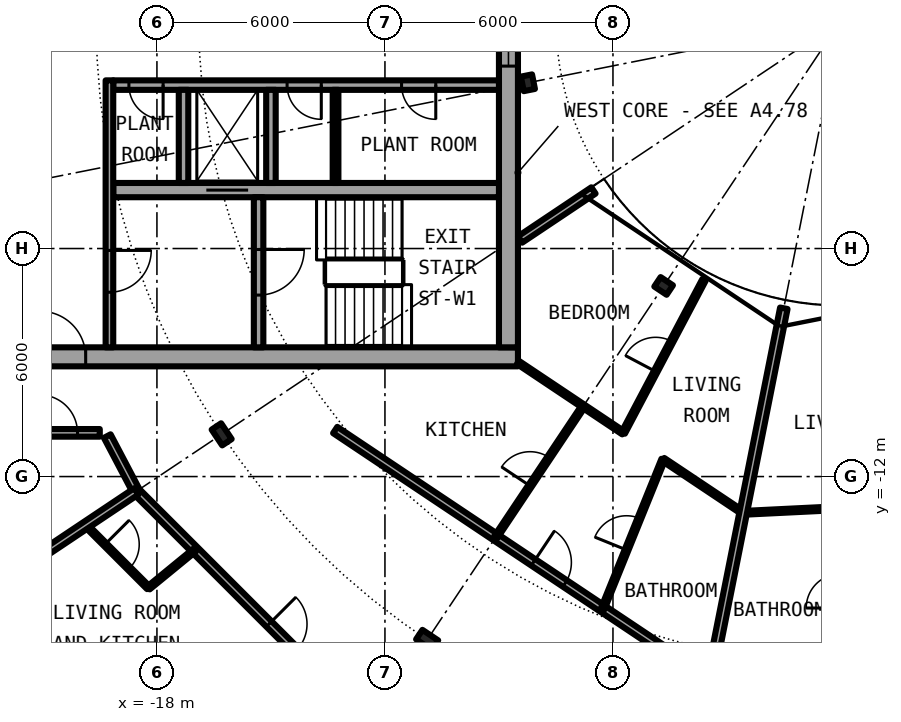
"""IFC4 building model, lengths in metres.
Left out: names, types, materials, properties, quantities, classifications, styles, units other than length and angle.
Written with IfcOpenShell. Run it as: python <this file> out.ifc"""

import sys

from ifc_helpers import new_model, si_unit, direction, frame, frame_2d, origin, origin_2d, place, context, subcontext, project, spatial, rectangle, i_section, extrude, element, fill, save


model = new_model("IFC4")
c1 = context("Model", 3, precision=1e-05, world=origin(), true_north=direction((0.0, 1.0)))
c2 = subcontext(c1, "Body", "Model", "MODEL_VIEW")
j1 = project(units=[si_unit("LENGTHUNIT", "METRE"), si_unit("PLANEANGLEUNIT", "RADIAN")], contexts=[c1])
p1 = place(None, origin())
s1 = spatial("IfcSite", under=j1, at=p1, CompositionType="ELEMENT")
p2 = place(p1, origin())
s2 = spatial("IfcBuilding", under=s1, at=p2, CompositionType="ELEMENT")
p3 = place(p2, frame((0.0, 0.0, 170.75)))
s3 = spatial("IfcBuildingStorey", under=s2, at=p3, CompositionType="ELEMENT", Elevation=170.75)
for number, where, z_axis, x_axis in (
    (1, (-16.297, -10.889, 0.0), (0.0, 0.0, 1.0), (-0.831, -0.556, 0.0)),
    (2, (-10.889, -16.297, 0.0), (0.0, 0.0, 1.0), (-0.556, -0.831, 0.0)),
):
    element("IfcColumn", number, at=place(p3, frame(where, z_axis=z_axis, x_axis=x_axis)), inside=s3, PredefinedType="COLUMN", context=c2, shape_type="SweptSolid", body=[
        extrude(i_section(OverallWidth=0.3, OverallDepth=0.5, WebThickness=0.014, FlangeThickness=0.028, FilletRadius=0.027, at=origin_2d()), origin(), (0.0, 0.0, 1.0), 3.05),
    ])
for number, where, z_axis, x_axis in (
    (3, (-8.239, -1.639, 0.0), (0.0, 0.0, 1.0), (-0.981, -0.195, 0.0)),
    (4, (-4.667, -6.984, 0.0), (0.0, 0.0, 1.0), (-0.556, -0.831, 0.0)),
):
    element("IfcColumn", number, at=place(p3, frame(where, z_axis=z_axis, x_axis=x_axis)), inside=s3, PredefinedType="COLUMN", context=c2, shape_type="SweptSolid", body=[
        extrude(i_section(OverallWidth=0.3, OverallDepth=0.39, WebThickness=0.011, FlangeThickness=0.019, FilletRadius=0.027, at=origin_2d()), origin(), (0.0, 0.0, 1.0), 3.05),
    ])
p4 = place(p3, frame((-22.699, -15.167, 0.0), z_axis=(0.0, 0.0, 1.0), x_axis=(0.634382322723, -0.773019449054, 0.0)))
e5 = element("IfcWall", 5, at=p4, inside=s3, PredefinedType="SOLIDWALL", context=c2, shape_type="SweptSolid", body=[
    extrude(rectangle(XDim=5.352, YDim=0.25, at=frame_2d((2.676, 0.0))), origin(), (0.0, 0.0, 1.0), 2.7),
])
p5 = place(p4, frame((0.841, 0.0, 0.0)))
e6 = element("IfcOpeningElement", 6, at=p5, cuts=e5, PredefinedType="OPENING", context=c2, shape_type="SweptSolid", body=[
    extrude(rectangle(XDim=1.0, YDim=2.2, at=frame_2d((0.5, 1.1))), frame((0.0, 0.135, 0.0), z_axis=(0.0, -1.0, 0.0), x_axis=(1.0, 0.0, 0.0)), (0.0, 0.0, 1.0), 0.27),
])
p6 = place(p4, frame((3.111, 0.0, 0.3)))
e7 = element("IfcOpeningElement", 7, at=p6, cuts=e5, PredefinedType="OPENING", context=c2, shape_type="SweptSolid", body=[
    extrude(rectangle(XDim=1.8, YDim=2.1, at=frame_2d((0.9, 1.05))), frame((0.0, 0.135, 0.0), z_axis=(0.0, -1.0, 0.0), x_axis=(1.0, 0.0, 0.0)), (0.0, 0.0, 1.0), 0.27),
])
p7 = place(p3, frame((-22.1, -8.85, 0.0), z_axis=(0.0, 0.0, 1.0), x_axis=(1.0, 0.0, 0.0)))
e8 = element("IfcWall", 8, at=p7, inside=s3, PredefinedType="SHEAR", context=c2, shape_type="SweptSolid", body=[
    extrude(rectangle(XDim=13.6, YDim=0.5, at=frame_2d((6.8, 0.0))), origin(), (0.0, 0.0, 1.0), 3.05),
])
p8 = place(p7, frame((1.025, 0.0, 0.0)))
e9 = element("IfcOpeningElement", 9, at=p8, cuts=e8, PredefinedType="OPENING", context=c2, shape_type="SweptSolid", body=[
    extrude(rectangle(XDim=1.2, YDim=2.3, at=frame_2d((0.6, 1.15))), frame((0.0, 0.26, 0.0), z_axis=(0.0, -1.0, 0.0), x_axis=(1.0, 0.0, 0.0)), (0.0, 0.0, 1.0), 0.52),
])
p9 = place(p3, frame((-8.75, 8.6, 0.0), z_axis=(0.0, 0.0, 1.0), x_axis=(0.0, -1.0, 0.0)))
e10 = element("IfcWall", 10, at=p9, inside=s3, PredefinedType="SHEAR", context=c2, shape_type="SweptSolid", body=[
    extrude(rectangle(XDim=17.2, YDim=0.5, at=frame_2d((8.6, 0.0))), origin(), (0.0, 0.0, 1.0), 3.05),
])
p10 = place(p9, frame((7.4, 0.0, 0.1)))
e11 = element("IfcOpeningElement", 11, at=p10, cuts=e10, PredefinedType="OPENING", context=c2, shape_type="SweptSolid", body=[
    extrude(rectangle(XDim=2.4, YDim=2.2, at=frame_2d((1.2, 1.1))), frame((0.0, 0.26, 0.0), z_axis=(0.0, -1.0, 0.0), x_axis=(1.0, 0.0, 0.0)), (0.0, 0.0, 1.0), 0.52),
])
p11 = place(p3, frame((-9.0, -1.7, 0.0), z_axis=(0.0, 0.0, 1.0), x_axis=(-1.0, 0.0, 0.0)))
e12 = element("IfcWall", 12, at=p11, inside=s3, PredefinedType="SHEAR", context=c2, shape_type="SweptSolid", body=[
    extrude(rectangle(XDim=10.15, YDim=0.25, at=frame_2d((5.075, 0.0))), origin(), (0.0, 0.0, 1.0), 3.05),
])
p12 = place(p11, frame((1.663, 0.0, 0.0)))
e13 = element("IfcOpeningElement", 13, at=p12, cuts=e12, PredefinedType="OPENING", context=c2, shape_type="SweptSolid", body=[
    extrude(rectangle(XDim=0.9, YDim=2.3, at=frame_2d((0.45, 1.15))), frame((0.0, 0.135, 0.0), z_axis=(0.0, -1.0, 0.0), x_axis=(1.0, 0.0, 0.0)), (0.0, 0.0, 1.0), 0.27),
])
p13 = place(p11, frame((4.675, 0.0, 0.0)))
e14 = element("IfcOpeningElement", 14, at=p13, cuts=e12, PredefinedType="OPENING", context=c2, shape_type="SweptSolid", body=[
    extrude(rectangle(XDim=0.9, YDim=2.3, at=frame_2d((0.45, 1.15))), frame((0.0, 0.135, 0.0), z_axis=(0.0, -1.0, 0.0), x_axis=(1.0, 0.0, 0.0)), (0.0, 0.0, 1.0), 0.27),
])
p14 = place(p11, frame((8.837, 0.0, 0.0)))
e15 = element("IfcOpeningElement", 15, at=p14, cuts=e12, PredefinedType="OPENING", context=c2, shape_type="SweptSolid", body=[
    extrude(rectangle(XDim=0.9, YDim=2.3, at=frame_2d((0.45, 1.15))), frame((0.0, 0.135, 0.0), z_axis=(0.0, -1.0, 0.0), x_axis=(1.0, 0.0, 0.0)), (0.0, 0.0, 1.0), 0.27),
])
p15 = place(p3, frame((-9.0, -4.462, 0.0), z_axis=(0.0, 0.0, 1.0), x_axis=(-1.0, 0.0, 0.0)))
e16 = element("IfcWall", 16, at=p15, inside=s3, PredefinedType="SHEAR", context=c2, shape_type="SweptSolid", body=[
    extrude(rectangle(XDim=10.15, YDim=0.375, at=frame_2d((5.075, 0.0))), origin(), (0.0, 0.0, 1.0), 3.05),
])
p16 = place(p15, frame((6.6, 0.0, 0.0)))
e17 = element("IfcOpeningElement", 17, at=p16, cuts=e16, PredefinedType="OPENING", context=c2, shape_type="SweptSolid", body=[
    extrude(rectangle(XDim=1.1, YDim=2.3, at=frame_2d((0.55, 1.15))), frame((0.0, 0.198, 0.0), z_axis=(0.0, -1.0, 0.0), x_axis=(1.0, 0.0, 0.0)), (0.0, 0.0, 1.0), 0.395),
])
p17 = place(p3, frame((-15.325, -4.65, 0.0), z_axis=(0.0, 0.0, 1.0), x_axis=(0.0, -1.0, 0.0)))
e18 = element("IfcWall", 18, at=p17, inside=s3, PredefinedType="SHEAR", context=c2, shape_type="SweptSolid", body=[
    extrude(rectangle(XDim=3.95, YDim=0.25, at=frame_2d((1.975, 0.0))), origin(), (0.0, 0.0, 1.0), 3.05),
])
p18 = place(p17, frame((1.375, 0.0, 0.0)))
e19 = element("IfcOpeningElement", 19, at=p18, cuts=e18, PredefinedType="OPENING", context=c2, shape_type="SweptSolid", body=[
    extrude(rectangle(XDim=1.2, YDim=2.3, at=frame_2d((0.6, 1.15))), frame((0.0, 0.135, 0.0), z_axis=(0.0, -1.0, 0.0), x_axis=(1.0, 0.0, 0.0)), (0.0, 0.0, 1.0), 0.27),
])
for number, where, z_axis, x_axis in (
    (20, (-15.0, -1.825, 0.0), (0.0, 0.0, 1.0), (0.0, -1.0, 0.0)),
    (21, (-17.3, -1.825, 0.0), (0.0, 0.0, 1.0), (0.0, -1.0, 0.0)),
):
    element("IfcWall", number, at=place(p3, frame(where, z_axis=z_axis, x_axis=x_axis)), inside=s3, PredefinedType="SOLIDWALL", context=c2, shape_type="SweptSolid", body=[
        extrude(rectangle(XDim=2.45, YDim=0.25, at=frame_2d((1.225, 0.0))), origin(), (0.0, 0.0, 1.0), 2.7),
    ])
p19 = place(p3, frame((-19.25, -1.575, 0.0), z_axis=(0.0, 0.0, 1.0), x_axis=(0.0, -1.0, 0.0)))
e22 = element("IfcWall", 22, at=p19, inside=s3, PredefinedType="SOLIDWALL", context=c2, shape_type="SweptSolid", body=[
    extrude(rectangle(XDim=7.025, YDim=0.2, at=frame_2d((3.513, 0.0))), origin(), (0.0, 0.0, 1.0), 2.7),
])
p20 = place(p19, frame((4.475, 0.0, 0.0)))
e23 = element("IfcOpeningElement", 23, at=p20, cuts=e22, PredefinedType="OPENING", context=c2, shape_type="SweptSolid", body=[
    extrude(rectangle(XDim=1.1, YDim=2.3, at=frame_2d((0.55, 1.15))), frame((0.0, 0.11, 0.0), z_axis=(0.0, -1.0, 0.0), x_axis=(1.0, 0.0, 0.0)), (0.0, 0.0, 1.0), 0.22),
])
p21 = place(p3, frame((-13.3, -1.825, 0.0), z_axis=(0.0, 0.0, 1.0), x_axis=(0.0, -1.0, 0.0)))
e24 = element("IfcWall", 24, at=p21, inside=s3, PredefinedType="PARTITIONING", context=c2, shape_type="SweptSolid", body=[
    extrude(rectangle(XDim=2.45, YDim=0.15, at=frame_2d((1.225, 0.0))), origin(), (0.0, 0.0, 1.0), 2.7),
])
p22 = place(p3, frame((-19.872, -13.278, 0.0), z_axis=(0.0, 0.0, 1.0), x_axis=(0.706897299114, -0.707316201218, 0.0)))
e25 = element("IfcWall", 25, at=p22, inside=s3, PredefinedType="PARTITIONING", context=c2, shape_type="SweptSolid", body=[
    extrude(rectangle(XDim=2.331, YDim=0.1, at=frame_2d((1.166, 0.0))), origin(), (0.0, 0.0, 1.0), 2.7),
])
p23 = place(p22, frame((0.716, 0.0, 0.0)))
e26 = element("IfcOpeningElement", 26, at=p23, cuts=e25, PredefinedType="OPENING", context=c2, shape_type="SweptSolid", body=[
    extrude(rectangle(XDim=0.9, YDim=2.3, at=frame_2d((0.45, 1.15))), frame((0.0, 0.06, 0.0), z_axis=(0.0, -1.0, 0.0), x_axis=(1.0, 0.0, 0.0)), (0.0, 0.0, 1.0), 0.12),
])
p24 = place(p3, frame((-19.307, -10.935, 0.0), z_axis=(0.0, 0.0, 1.0), x_axis=(0.465605550524, -0.884992356646, 0.0)))
e27 = element("IfcWall", 27, at=p24, inside=s3, PredefinedType="PARTITIONING", context=c2, shape_type="SweptSolid", body=[
    extrude(rectangle(XDim=1.643, YDim=0.2, at=frame_2d((0.821, 0.0))), origin(), (0.0, 0.0, 1.0), 2.7),
])
p25 = place(p3, frame((-18.542, -12.389, 0.0), z_axis=(0.0, 0.0, 1.0), x_axis=(0.707106781187, -0.707106781187, 0.0)))
e28 = element("IfcWall", 28, at=p25, inside=s3, PredefinedType="PARTITIONING", context=c2, shape_type="SweptSolid", body=[
    extrude(rectangle(XDim=8.702, YDim=0.2, at=frame_2d((4.351, 0.0))), origin(), (0.0, 0.0, 1.0), 2.7),
])
p26 = place(p25, frame((4.938, 0.0, 0.0)))
e29 = element("IfcOpeningElement", 29, at=p26, cuts=e28, PredefinedType="OPENING", context=c2, shape_type="SweptSolid", body=[
    extrude(rectangle(XDim=1.0, YDim=2.3, at=frame_2d((0.5, 1.15))), frame((0.0, 0.11, 0.0), z_axis=(0.0, -1.0, 0.0), x_axis=(1.0, 0.0, 0.0)), (0.0, 0.0, 1.0), 0.22),
])
p27 = place(p3, frame((-13.309, -10.775, 0.0), z_axis=(0.0, 0.0, 1.0), x_axis=(0.831501812692, -0.555522038708, 0.0)))
e30 = element("IfcWall", 30, at=p27, inside=s3, PredefinedType="PARTITIONING", context=c2, shape_type="SweptSolid", body=[
    extrude(rectangle(XDim=11.856, YDim=0.2, at=frame_2d((5.928, 0.0))), origin(), (0.0, 0.0, 1.0), 2.7),
])
p28 = place(p27, frame((6.272, 0.0, 0.0)))
e31 = element("IfcOpeningElement", 31, at=p28, cuts=e30, PredefinedType="OPENING", context=c2, shape_type="SweptSolid", body=[
    extrude(rectangle(XDim=1.0, YDim=2.3, at=frame_2d((0.5, 1.15))), frame((0.0, 0.11, 0.0), z_axis=(0.0, -1.0, 0.0), x_axis=(1.0, 0.0, 0.0)), (0.0, 0.0, 1.0), 0.22),
])
p29 = place(p3, frame((-2.577, -12.955, 0.0), z_axis=(0.0, 0.0, 1.0), x_axis=(0.998796046378, 0.049055659616, 0.0)))
e32 = element("IfcWall", 32, at=p29, inside=s3, PredefinedType="PARTITIONING", context=c2, shape_type="SweptSolid", body=[
    extrude(rectangle(XDim=2.568, YDim=0.1, at=frame_2d((1.284, 0.0))), origin(), (0.0, 0.0, 1.0), 2.7),
])
p30 = place(p3, frame((-8.5, -8.998, 0.0), z_axis=(0.0, 0.0, 1.0), x_axis=(0.831531456502, -0.55547766548, 0.0)))
e33 = element("IfcWall", 33, at=p30, inside=s3, PredefinedType="PARTITIONING", context=c2, shape_type="SweptSolid", body=[
    extrude(rectangle(XDim=3.333, YDim=0.1, at=frame_2d((1.666, 0.0))), origin(), (0.0, 0.0, 1.0), 2.7),
])
p31 = place(p3, frame((-4.677, -11.552, 0.0), z_axis=(0.0, 0.0, 1.0), x_axis=(0.83155963659, -0.555435478517, 0.0)))
e34 = element("IfcWall", 34, at=p31, inside=s3, PredefinedType="PARTITIONING", context=c2, shape_type="SweptSolid", body=[
    extrude(rectangle(XDim=2.528, YDim=0.1, at=frame_2d((1.264, 0.0))), origin(), (0.0, 0.0, 1.0), 2.7),
])
p32 = place(p3, frame((-21.675, -10.85, 0.0), z_axis=(0.0, 0.0, 1.0), x_axis=(1.0, 0.0, 0.0)))
e35 = element("IfcWall", 35, at=p32, inside=s3, PredefinedType="PARTITIONING", context=c2, shape_type="SweptSolid", body=[
    extrude(rectangle(XDim=2.171, YDim=0.2, at=frame_2d((1.085, 0.0))), origin(), (0.0, 0.0, 1.0), 2.7),
])
p33 = place(p32, frame((0.585, 0.0, 0.0)))
e36 = element("IfcOpeningElement", 36, at=p33, cuts=e35, PredefinedType="OPENING", context=c2, shape_type="SweptSolid", body=[
    extrude(rectangle(XDim=1.0, YDim=2.3, at=frame_2d((0.5, 1.15))), frame((0.0, 0.11, 0.0), z_axis=(0.0, -1.0, 0.0), x_axis=(1.0, 0.0, 0.0)), (0.0, 0.0, 1.0), 0.22),
])
p34 = place(p3, frame((-6.513, -4.472, 0.0), z_axis=(0.0, 0.0, 1.0), x_axis=(-0.83133816625, -0.555766905579, 0.0)))
e37 = element("IfcWall", 37, at=p34, inside=s3, PredefinedType="PARTITIONING", context=c2, shape_type="SweptSolid", body=[
    extrude(rectangle(XDim=2.323, YDim=0.2, at=frame_2d((1.162, 0.0))), origin(), (0.0, 0.0, 1.0), 2.7),
])
p35 = place(p3, frame((-22.595, -15.098, 0.0), z_axis=(0.0, 0.0, 1.0), x_axis=(0.831387096605, 0.55569370664, 0.0)))
e38 = element("IfcWall", 38, at=p35, inside=s3, PredefinedType="PARTITIONING", context=c2, shape_type="SweptSolid", body=[
    extrude(rectangle(XDim=4.875, YDim=0.2, at=frame_2d((2.438, 0.0))), origin(), (0.0, 0.0, 1.0), 2.7),
])
p36 = place(p3, frame((-18.222, -14.93, 0.0), z_axis=(0.0, 0.0, 1.0), x_axis=(0.773633255921, 0.633633636523, 0.0)))
e39 = element("IfcWall", 39, at=p36, inside=s3, PredefinedType="PARTITIONING", context=c2, shape_type="SweptSolid", body=[
    extrude(rectangle(XDim=1.578, YDim=0.1, at=frame_2d((0.789, 0.0))), origin(), (0.0, 0.0, 1.0), 2.7),
])
p37 = place(p3, frame((-9.085, -13.597, 0.0), z_axis=(0.0, 0.0, 1.0), x_axis=(0.555528237031, 0.831497671591, 0.0)))
e40 = element("IfcWall", 40, at=p37, inside=s3, PredefinedType="PARTITIONING", context=c2, shape_type="SweptSolid", body=[
    extrude(rectangle(XDim=4.149, YDim=0.1, at=frame_2d((2.075, 0.0))), origin(), (0.0, 0.0, 1.0), 2.7),
])
p38 = place(p37, frame((1.625, 0.0, 0.0)))
e41 = element("IfcOpeningElement", 41, at=p38, cuts=e40, PredefinedType="OPENING", context=c2, shape_type="SweptSolid", body=[
    extrude(rectangle(XDim=0.9, YDim=2.3, at=frame_2d((0.45, 1.15))), frame((0.0, 0.06, 0.0), z_axis=(0.0, -1.0, 0.0), x_axis=(1.0, 0.0, 0.0)), (0.0, 0.0, 1.0), 0.12),
])
p39 = place(p3, frame((-6.269, -15.478, 0.0), z_axis=(0.0, 0.0, 1.0), x_axis=(0.375509828455, 0.926818411952, 0.0)))
e42 = element("IfcWall", 42, at=p39, inside=s3, PredefinedType="PARTITIONING", context=c2, shape_type="SweptSolid", body=[
    extrude(rectangle(XDim=4.237, YDim=0.1, at=frame_2d((2.119, 0.0))), origin(), (0.0, 0.0, 1.0), 2.7),
])
p40 = place(p39, frame((1.669, 0.0, 0.0)))
e43 = element("IfcOpeningElement", 43, at=p40, cuts=e42, PredefinedType="OPENING", context=c2, shape_type="SweptSolid", body=[
    extrude(rectangle(XDim=0.9, YDim=2.3, at=frame_2d((0.45, 1.15))), frame((0.0, 0.06, 0.0), z_axis=(0.0, -1.0, 0.0), x_axis=(1.0, 0.0, 0.0)), (0.0, 0.0, 1.0), 0.12),
])
p41 = place(p3, frame((-5.729, -10.849, 0.0), z_axis=(0.0, 0.0, 1.0), x_axis=(0.466962677975, 0.884277025246, 0.0)))
e44 = element("IfcWall", 44, at=p41, inside=s3, PredefinedType="PARTITIONING", context=c2, shape_type="SweptSolid", body=[
    extrude(rectangle(XDim=4.549, YDim=0.1, at=frame_2d((2.274, 0.0))), origin(), (0.0, 0.0, 1.0), 2.7),
])
p42 = place(p41, frame((1.824, 0.0, 0.0)))
e45 = element("IfcOpeningElement", 45, at=p42, cuts=e44, PredefinedType="OPENING", context=c2, shape_type="SweptSolid", body=[
    extrude(rectangle(XDim=0.9, YDim=2.3, at=frame_2d((0.45, 1.15))), frame((0.0, 0.06, 0.0), z_axis=(0.0, -1.0, 0.0), x_axis=(1.0, 0.0, 0.0)), (0.0, 0.0, 1.0), 0.12),
])
p43 = place(p3, frame((-3.45, -17.36, 0.0), z_axis=(0.0, 0.0, 1.0), x_axis=(0.195001023206, 0.980803038815, 0.0)))
e46 = element("IfcWall", 46, at=p43, inside=s3, PredefinedType="PARTITIONING", context=c2, shape_type="SweptSolid", body=[
    extrude(rectangle(XDim=9.98, YDim=0.2, at=frame_2d((4.99, 0.0))), origin(), (0.0, 0.0, 1.0), 2.7),
])
p44 = place(p16, origin())
e47 = element("IfcDoor", 47, at=p44, inside=s3, OperationType="DOUBLE_DOOR_SLIDING", PredefinedType="DOOR", context=c2, shape_type="SweptSolid", body=[
    extrude(rectangle(XDim=1.1, YDim=2.3, at=frame_2d((0.55, 1.15))), frame((0.0, 0.025, 0.0), z_axis=(0.0, -1.0, 0.0), x_axis=(1.0, 0.0, 0.0)), (0.0, 0.0, 1.0), 0.05),
])
fill(e17, e47)
p45 = place(p12, origin())
e48 = element("IfcDoor", 48, at=p45, inside=s3, OperationType="SINGLE_SWING_RIGHT", PredefinedType="DOOR", context=c2, shape_type="SweptSolid", body=[
    extrude(rectangle(XDim=0.9, YDim=2.3, at=frame_2d((0.45, 1.15))), frame((0.0, 0.025, 0.0), z_axis=(0.0, -1.0, 0.0), x_axis=(1.0, 0.0, 0.0)), (0.0, 0.0, 1.0), 0.05),
])
fill(e13, e48)
p46 = place(p13, origin())
e49 = element("IfcDoor", 49, at=p46, inside=s3, OperationType="SINGLE_SWING_LEFT", PredefinedType="DOOR", context=c2, shape_type="SweptSolid", body=[
    extrude(rectangle(XDim=0.9, YDim=2.3, at=frame_2d((0.45, 1.15))), frame((0.0, 0.025, 0.0), z_axis=(0.0, -1.0, 0.0), x_axis=(1.0, 0.0, 0.0)), (0.0, 0.0, 1.0), 0.05),
])
fill(e14, e49)
p47 = place(p14, origin())
e50 = element("IfcDoor", 50, at=p47, inside=s3, OperationType="SINGLE_SWING_LEFT", PredefinedType="DOOR", context=c2, shape_type="SweptSolid", body=[
    extrude(rectangle(XDim=0.9, YDim=2.3, at=frame_2d((0.45, 1.15))), frame((0.0, 0.025, 0.0), z_axis=(0.0, -1.0, 0.0), x_axis=(1.0, 0.0, 0.0)), (0.0, 0.0, 1.0), 0.05),
])
fill(e15, e50)
p48 = place(p18, origin())
e51 = element("IfcDoor", 51, at=p48, inside=s3, OperationType="SINGLE_SWING_LEFT", PredefinedType="DOOR", context=c2, shape_type="SweptSolid", body=[
    extrude(rectangle(XDim=1.2, YDim=2.3, at=frame_2d((0.6, 1.15))), frame((0.0, 0.025, 0.0), z_axis=(0.0, -1.0, 0.0), x_axis=(1.0, 0.0, 0.0)), (0.0, 0.0, 1.0), 0.05),
])
fill(e19, e51)
p49 = place(p20, origin())
e52 = element("IfcDoor", 52, at=p49, inside=s3, OperationType="SINGLE_SWING_LEFT", PredefinedType="DOOR", context=c2, shape_type="SweptSolid", body=[
    extrude(rectangle(XDim=1.1, YDim=2.3, at=frame_2d((0.55, 1.15))), frame((0.0, 0.025, 0.0), z_axis=(0.0, -1.0, 0.0), x_axis=(1.0, 0.0, 0.0)), (0.0, 0.0, 1.0), 0.05),
])
fill(e23, e52)
p50 = place(p8, origin())
e53 = element("IfcDoor", 53, at=p50, inside=s3, OperationType="SINGLE_SWING_RIGHT", PredefinedType="DOOR", context=c2, shape_type="SweptSolid", body=[
    extrude(rectangle(XDim=1.2, YDim=2.3, at=frame_2d((0.6, 1.15))), frame((0.0, 0.025, 0.0), z_axis=(0.0, -1.0, 0.0), x_axis=(1.0, 0.0, 0.0)), (0.0, 0.0, 1.0), 0.05),
])
fill(e9, e53)
p51 = place(p10, origin())
e54 = element("IfcWindow", 54, at=p51, inside=s3, PartitioningType="SINGLE_PANEL", PredefinedType="WINDOW", context=c2, shape_type="SweptSolid", body=[
    extrude(rectangle(XDim=2.4, YDim=2.2, at=frame_2d((1.2, 1.1))), frame((0.0, 0.03, 0.0), z_axis=(0.0, -1.0, 0.0), x_axis=(1.0, 0.0, 0.0)), (0.0, 0.0, 1.0), 0.06),
])
fill(e11, e54)
p52 = place(p26, origin())
e55 = element("IfcDoor", 55, at=p52, inside=s3, OperationType="SINGLE_SWING_RIGHT", PredefinedType="DOOR", context=c2, shape_type="SweptSolid", body=[
    extrude(rectangle(XDim=1.0, YDim=2.3, at=frame_2d((0.5, 1.15))), frame((0.0, 0.025, 0.0), z_axis=(0.0, -1.0, 0.0), x_axis=(1.0, 0.0, 0.0)), (0.0, 0.0, 1.0), 0.05),
])
fill(e29, e55)
p53 = place(p23, origin())
e56 = element("IfcDoor", 56, at=p53, inside=s3, OperationType="SINGLE_SWING_RIGHT", PredefinedType="DOOR", context=c2, shape_type="SweptSolid", body=[
    extrude(rectangle(XDim=0.9, YDim=2.3, at=frame_2d((0.45, 1.15))), frame((0.0, 0.025, 0.0), z_axis=(0.0, -1.0, 0.0), x_axis=(1.0, 0.0, 0.0)), (0.0, 0.0, 1.0), 0.05),
])
fill(e26, e56)
p54 = place(p28, origin())
e57 = element("IfcDoor", 57, at=p54, inside=s3, OperationType="SINGLE_SWING_RIGHT", PredefinedType="DOOR", context=c2, shape_type="SweptSolid", body=[
    extrude(rectangle(XDim=1.0, YDim=2.3, at=frame_2d((0.5, 1.15))), frame((0.0, 0.025, 0.0), z_axis=(0.0, -1.0, 0.0), x_axis=(1.0, 0.0, 0.0)), (0.0, 0.0, 1.0), 0.05),
])
fill(e31, e57)
p55 = place(p40, origin())
e58 = element("IfcDoor", 58, at=p55, inside=s3, OperationType="SINGLE_SWING_LEFT", PredefinedType="DOOR", context=c2, shape_type="SweptSolid", body=[
    extrude(rectangle(XDim=0.9, YDim=2.3, at=frame_2d((0.45, 1.15))), frame((0.0, 0.025, 0.0), z_axis=(0.0, -1.0, 0.0), x_axis=(1.0, 0.0, 0.0)), (0.0, 0.0, 1.0), 0.05),
])
fill(e43, e58)
p56 = place(p38, origin())
e59 = element("IfcDoor", 59, at=p56, inside=s3, OperationType="SINGLE_SWING_LEFT", PredefinedType="DOOR", context=c2, shape_type="SweptSolid", body=[
    extrude(rectangle(XDim=0.9, YDim=2.3, at=frame_2d((0.45, 1.15))), frame((0.0, 0.025, 0.0), z_axis=(0.0, -1.0, 0.0), x_axis=(1.0, 0.0, 0.0)), (0.0, 0.0, 1.0), 0.05),
])
fill(e41, e59)
p57 = place(p42, origin())
e60 = element("IfcDoor", 60, at=p57, inside=s3, OperationType="SINGLE_SWING_RIGHT", PredefinedType="DOOR", context=c2, shape_type="SweptSolid", body=[
    extrude(rectangle(XDim=0.9, YDim=2.3, at=frame_2d((0.45, 1.15))), frame((0.0, 0.025, 0.0), z_axis=(0.0, -1.0, 0.0), x_axis=(1.0, 0.0, 0.0)), (0.0, 0.0, 1.0), 0.05),
])
fill(e45, e60)
p58 = place(p33, origin())
e61 = element("IfcDoor", 61, at=p58, inside=s3, OperationType="SINGLE_SWING_LEFT", PredefinedType="DOOR", context=c2, shape_type="SweptSolid", body=[
    extrude(rectangle(XDim=1.0, YDim=2.3, at=frame_2d((0.5, 1.15))), frame((0.0, 0.025, 0.0), z_axis=(0.0, -1.0, 0.0), x_axis=(1.0, 0.0, 0.0)), (0.0, 0.0, 1.0), 0.05),
])
fill(e36, e61)
save(model, sys.argv[1])
